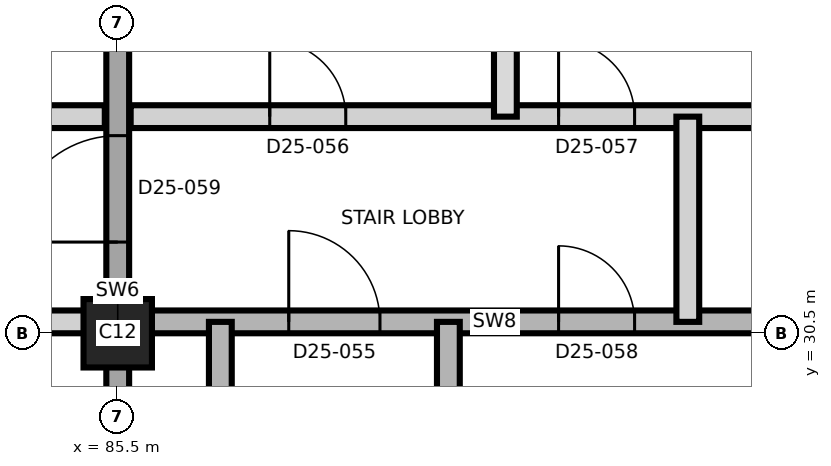
"""IFC4 building model, lengths in metres.
Left out: names, types, materials, properties, quantities, classifications, styles, units other than length and angle.
Written with IfcOpenShell. Run it as: python <this file> out.ifc"""

import sys

from ifc_helpers import new_model, si_unit, direction, frame, frame_2d, origin, origin_2d, place, context, subcontext, project, spatial, rectangle, extrude, element, fill, save


model = new_model("IFC4")
c1 = context("Model", 3, precision=1e-05, world=origin(), true_north=direction((0.0, 1.0)))
c2 = subcontext(c1, "Body", "Model", "MODEL_VIEW")
j1 = project(units=[si_unit("LENGTHUNIT", "METRE"), si_unit("PLANEANGLEUNIT", "RADIAN")], contexts=[c1])
p1 = place(None, origin())
s1 = spatial("IfcSite", under=j1, at=p1, CompositionType="ELEMENT")
p2 = place(p1, origin())
s2 = spatial("IfcBuilding", under=s1, at=p2, CompositionType="ELEMENT")
p3 = place(p2, frame((0.0, 0.0, 225.4)))
s3 = spatial("IfcBuildingStorey", under=s2, at=p3, CompositionType="ELEMENT", Elevation=225.4)
p4 = place(p3, frame((85.5, 30.5, 0.0), z_axis=(0.0, 0.0, 1.0), x_axis=(1.0, 0.0, 0.0)))
e1 = element("IfcColumn", 1, at=p4, inside=s3, PredefinedType="COLUMN", context=c2, shape_type="SweptSolid", body=[
    extrude(rectangle(XDim=0.9, YDim=0.9, at=origin_2d()), origin(), (0.0, 0.0, 1.0), 3.7),
])
p5 = place(p3, frame((85.5, 20.35, 0.0), z_axis=(0.0, 0.0, 1.0), x_axis=(0.0, 1.0, 0.0)))
e2 = element("IfcWall", 2, at=p5, inside=s3, PredefinedType="SHEAR", context=c2, shape_type="SweptSolid", body=[
    extrude(rectangle(XDim=20.3, YDim=0.3, at=frame_2d((10.15, 0.0))), origin(), (0.0, 0.0, 1.0), 3.7),
])
p6 = place(p5, frame((11.35, 0.0, 0.0)))
e3 = element("IfcOpeningElement", 3, at=p6, cuts=e2, PredefinedType="OPENING", context=c2, shape_type="SweptSolid", body=[
    extrude(rectangle(XDim=1.4, YDim=2.1, at=frame_2d((0.7, 1.05))), frame((0.0, 0.16, 0.0), z_axis=(0.0, -1.0, 0.0), x_axis=(1.0, 0.0, 0.0)), (0.0, 0.0, 1.0), 0.32),
])
p7 = place(p3, frame((58.55, 30.65, 0.0), z_axis=(0.0, 0.0, 1.0), x_axis=(1.0, 0.0, 0.0)))
e4 = element("IfcWall", 4, at=p7, inside=s3, PredefinedType="PARTITIONING", context=c2, shape_type="SweptSolid", body=[
    extrude(rectangle(XDim=26.78, YDim=0.3, at=frame_2d((13.39, 0.0))), origin(), (0.0, 0.0, 1.0), 3.4),
])
p8 = place(p7, frame((1.65, 0.0, 0.0)))
e5 = element("IfcOpeningElement", 5, at=p8, cuts=e4, PredefinedType="OPENING", context=c2, shape_type="SweptSolid", body=[
    extrude(rectangle(XDim=1.2, YDim=2.1, at=frame_2d((0.6, 1.05))), frame((0.0, 0.16, 0.0), z_axis=(0.0, -1.0, 0.0), x_axis=(1.0, 0.0, 0.0)), (0.0, 0.0, 1.0), 0.32),
])
p9 = place(p7, frame((4.9, 0.0, 0.0)))
e6 = element("IfcOpeningElement", 6, at=p9, cuts=e4, PredefinedType="OPENING", context=c2, shape_type="SweptSolid", body=[
    extrude(rectangle(XDim=1.0, YDim=2.1, at=frame_2d((0.5, 1.05))), frame((0.0, 0.16, 0.0), z_axis=(0.0, -1.0, 0.0), x_axis=(1.0, 0.0, 0.0)), (0.0, 0.0, 1.0), 0.32),
])
p10 = place(p7, frame((12.95, 0.0, 0.0)))
e7 = element("IfcOpeningElement", 7, at=p10, cuts=e4, PredefinedType="OPENING", context=c2, shape_type="SweptSolid", body=[
    extrude(rectangle(XDim=1.0, YDim=2.4, at=frame_2d((0.5, 1.2))), frame((0.0, 0.16, 0.0), z_axis=(0.0, -1.0, 0.0), x_axis=(1.0, 0.0, 0.0)), (0.0, 0.0, 1.0), 0.32),
])
p11 = place(p7, frame((19.085, 0.0, 0.0)))
e8 = element("IfcOpeningElement", 8, at=p11, cuts=e4, PredefinedType="OPENING", context=c2, shape_type="SweptSolid", body=[
    extrude(rectangle(XDim=1.2, YDim=2.1, at=frame_2d((0.6, 1.05))), frame((0.0, 0.16, 0.0), z_axis=(0.0, -1.0, 0.0), x_axis=(1.0, 0.0, 0.0)), (0.0, 0.0, 1.0), 0.32),
])
p12 = place(p7, frame((22.335, 0.0, 0.0)))
e9 = element("IfcOpeningElement", 9, at=p12, cuts=e4, PredefinedType="OPENING", context=c2, shape_type="SweptSolid", body=[
    extrude(rectangle(XDim=1.0, YDim=2.1, at=frame_2d((0.5, 1.05))), frame((0.0, 0.16, 0.0), z_axis=(0.0, -1.0, 0.0), x_axis=(1.0, 0.0, 0.0)), (0.0, 0.0, 1.0), 0.32),
])
p13 = place(p3, frame((85.67, 30.65, 0.0), z_axis=(0.0, 0.0, 1.0), x_axis=(1.0, 0.0, 0.0)))
e10 = element("IfcWall", 10, at=p13, inside=s3, PredefinedType="SHEAR", context=c2, shape_type="SweptSolid", body=[
    extrude(rectangle(XDim=9.58, YDim=0.3, at=frame_2d((4.79, 0.0))), origin(), (0.0, 0.0, 1.0), 3.4),
])
p14 = place(p13, frame((2.08, 0.0, 0.0)))
e11 = element("IfcOpeningElement", 11, at=p14, cuts=e10, PredefinedType="OPENING", context=c2, shape_type="SweptSolid", body=[
    extrude(rectangle(XDim=1.2, YDim=2.1, at=frame_2d((0.6, 1.05))), frame((0.0, 0.16, 0.0), z_axis=(0.0, -1.0, 0.0), x_axis=(1.0, 0.0, 0.0)), (0.0, 0.0, 1.0), 0.32),
])
p15 = place(p13, frame((5.63, 0.0, 0.0)))
e12 = element("IfcOpeningElement", 12, at=p15, cuts=e10, PredefinedType="OPENING", context=c2, shape_type="SweptSolid", body=[
    extrude(rectangle(XDim=1.0, YDim=2.1, at=frame_2d((0.5, 1.05))), frame((0.0, 0.16, 0.0), z_axis=(0.0, -1.0, 0.0), x_axis=(1.0, 0.0, 0.0)), (0.0, 0.0, 1.0), 0.32),
])
p16 = place(p3, frame((58.55, 33.35, 0.0), z_axis=(0.0, 0.0, 1.0), x_axis=(1.0, 0.0, 0.0)))
e13 = element("IfcWall", 13, at=p16, inside=s3, PredefinedType="PARTITIONING", context=c2, shape_type="SweptSolid", body=[
    extrude(rectangle(XDim=26.78, YDim=0.3, at=frame_2d((13.39, 0.0))), origin(), (0.0, 0.0, 1.0), 3.4),
])
p17 = place(p16, frame((3.95, 0.0, 0.0)))
e14 = element("IfcOpeningElement", 14, at=p17, cuts=e13, PredefinedType="OPENING", context=c2, shape_type="SweptSolid", body=[
    extrude(rectangle(XDim=1.0, YDim=2.4, at=frame_2d((0.5, 1.2))), frame((0.0, 0.16, 0.0), z_axis=(0.0, -1.0, 0.0), x_axis=(1.0, 0.0, 0.0)), (0.0, 0.0, 1.0), 0.32),
])
p18 = place(p16, frame((10.085, 0.0, 0.0)))
e15 = element("IfcOpeningElement", 15, at=p18, cuts=e13, PredefinedType="OPENING", context=c2, shape_type="SweptSolid", body=[
    extrude(rectangle(XDim=1.2, YDim=2.1, at=frame_2d((0.6, 1.05))), frame((0.0, 0.16, 0.0), z_axis=(0.0, -1.0, 0.0), x_axis=(1.0, 0.0, 0.0)), (0.0, 0.0, 1.0), 0.32),
])
p19 = place(p16, frame((13.335, 0.0, 0.0)))
e16 = element("IfcOpeningElement", 16, at=p19, cuts=e13, PredefinedType="OPENING", context=c2, shape_type="SweptSolid", body=[
    extrude(rectangle(XDim=1.0, YDim=2.1, at=frame_2d((0.5, 1.05))), frame((0.0, 0.16, 0.0), z_axis=(0.0, -1.0, 0.0), x_axis=(1.0, 0.0, 0.0)), (0.0, 0.0, 1.0), 0.32),
])
p20 = place(p16, frame((20.3, 0.0, 0.0)))
e17 = element("IfcOpeningElement", 17, at=p20, cuts=e13, PredefinedType="OPENING", context=c2, shape_type="SweptSolid", body=[
    extrude(rectangle(XDim=1.0, YDim=2.4, at=frame_2d((0.5, 1.2))), frame((0.0, 0.16, 0.0), z_axis=(0.0, -1.0, 0.0), x_axis=(1.0, 0.0, 0.0)), (0.0, 0.0, 1.0), 0.32),
])
p21 = place(p3, frame((85.67, 33.35, 0.0), z_axis=(0.0, 0.0, 1.0), x_axis=(1.0, 0.0, 0.0)))
e18 = element("IfcWall", 18, at=p21, inside=s3, PredefinedType="PARTITIONING", context=c2, shape_type="SweptSolid", body=[
    extrude(rectangle(XDim=9.58, YDim=0.3, at=frame_2d((4.79, 0.0))), origin(), (0.0, 0.0, 1.0), 3.4),
])
p22 = place(p21, frame((1.83, 0.0, 0.0)))
e19 = element("IfcOpeningElement", 19, at=p22, cuts=e18, PredefinedType="OPENING", context=c2, shape_type="SweptSolid", body=[
    extrude(rectangle(XDim=1.0, YDim=2.1, at=frame_2d((0.5, 1.05))), frame((0.0, 0.16, 0.0), z_axis=(0.0, -1.0, 0.0), x_axis=(1.0, 0.0, 0.0)), (0.0, 0.0, 1.0), 0.32),
])
p23 = place(p21, frame((5.63, 0.0, 0.0)))
e20 = element("IfcOpeningElement", 20, at=p23, cuts=e18, PredefinedType="OPENING", context=c2, shape_type="SweptSolid", body=[
    extrude(rectangle(XDim=1.0, YDim=2.1, at=frame_2d((0.5, 1.05))), frame((0.0, 0.16, 0.0), z_axis=(0.0, -1.0, 0.0), x_axis=(1.0, 0.0, 0.0)), (0.0, 0.0, 1.0), 0.32),
])
for number, where, z_axis, x_axis in (
    (21, (86.85, 21.8, 0.0), (0.0, 0.0, 1.0), (0.0, 1.0, 0.0)),
    (22, (89.85, 21.8, 0.0), (0.0, 0.0, 1.0), (0.0, 1.0, 0.0)),
):
    element("IfcWall", number, at=place(p3, frame(where, z_axis=z_axis, x_axis=x_axis)), inside=s3, PredefinedType="SHEAR", context=c2, shape_type="SweptSolid", body=[
        extrude(rectangle(XDim=8.85, YDim=0.3, at=frame_2d((4.425, 0.0))), origin(), (0.0, 0.0, 1.0), 3.4),
    ])
p24 = place(p3, frame((90.6, 33.35, 0.0), z_axis=(0.0, 0.0, 1.0), x_axis=(0.0, 1.0, 0.0)))
e23 = element("IfcWall", 23, at=p24, inside=s3, PredefinedType="PARTITIONING", context=c2, shape_type="SweptSolid", body=[
    extrude(rectangle(XDim=6.898, YDim=0.3, at=frame_2d((3.449, 0.0))), origin(), (0.0, 0.0, 1.0), 3.4),
])
p25 = place(p3, frame((93.0, 30.65, 0.0), z_axis=(0.0, 0.0, 1.0), x_axis=(0.0, 1.0, 0.0)))
e24 = element("IfcWall", 24, at=p25, inside=s3, PredefinedType="PARTITIONING", context=c2, shape_type="SweptSolid", body=[
    extrude(rectangle(XDim=2.7, YDim=0.3, at=frame_2d((1.35, 0.0))), origin(), (0.0, 0.0, 1.0), 3.4),
])
p26 = place(p14, origin())
e25 = element("IfcDoor", 25, at=p26, inside=s3, OperationType="SINGLE_SWING_LEFT", PredefinedType="DOOR", context=c2, shape_type="SweptSolid", body=[
    extrude(rectangle(XDim=1.2, YDim=2.1, at=frame_2d((0.6, 1.05))), frame((0.0, 0.025, 0.0), z_axis=(0.0, -1.0, 0.0), x_axis=(1.0, 0.0, 0.0)), (0.0, 0.0, 1.0), 0.05),
])
fill(e11, e25)
p27 = place(p22, origin())
e26 = element("IfcDoor", 26, at=p27, inside=s3, OperationType="SINGLE_SWING_LEFT", PredefinedType="DOOR", context=c2, shape_type="SweptSolid", body=[
    extrude(rectangle(XDim=1.0, YDim=2.1, at=frame_2d((0.5, 1.05))), frame((0.0, 0.025, 0.0), z_axis=(0.0, -1.0, 0.0), x_axis=(1.0, 0.0, 0.0)), (0.0, 0.0, 1.0), 0.05),
])
fill(e19, e26)
p28 = place(p23, origin())
e27 = element("IfcDoor", 27, at=p28, inside=s3, OperationType="SINGLE_SWING_RIGHT", PredefinedType="DOOR", context=c2, shape_type="SweptSolid", body=[
    extrude(rectangle(XDim=1.0, YDim=2.1, at=frame_2d((0.5, 1.05))), frame((0.0, 0.025, 0.0), z_axis=(0.0, -1.0, 0.0), x_axis=(1.0, 0.0, 0.0)), (0.0, 0.0, 1.0), 0.05),
])
fill(e20, e27)
p29 = place(p15, origin())
e28 = element("IfcDoor", 28, at=p29, inside=s3, OperationType="SINGLE_SWING_LEFT", PredefinedType="DOOR", context=c2, shape_type="SweptSolid", body=[
    extrude(rectangle(XDim=1.0, YDim=2.1, at=frame_2d((0.5, 1.05))), frame((0.0, 0.025, 0.0), z_axis=(0.0, -1.0, 0.0), x_axis=(1.0, 0.0, 0.0)), (0.0, 0.0, 1.0), 0.05),
])
fill(e12, e28)
p30 = place(p6, origin())
e29 = element("IfcDoor", 29, at=p30, inside=s3, OperationType="SINGLE_SWING_RIGHT", PredefinedType="DOOR", context=c2, shape_type="SweptSolid", body=[
    extrude(rectangle(XDim=1.4, YDim=2.1, at=frame_2d((0.7, 1.05))), frame((0.0, 0.025, 0.0), z_axis=(0.0, -1.0, 0.0), x_axis=(1.0, 0.0, 0.0)), (0.0, 0.0, 1.0), 0.05),
])
fill(e3, e29)
save(model, sys.argv[1])
